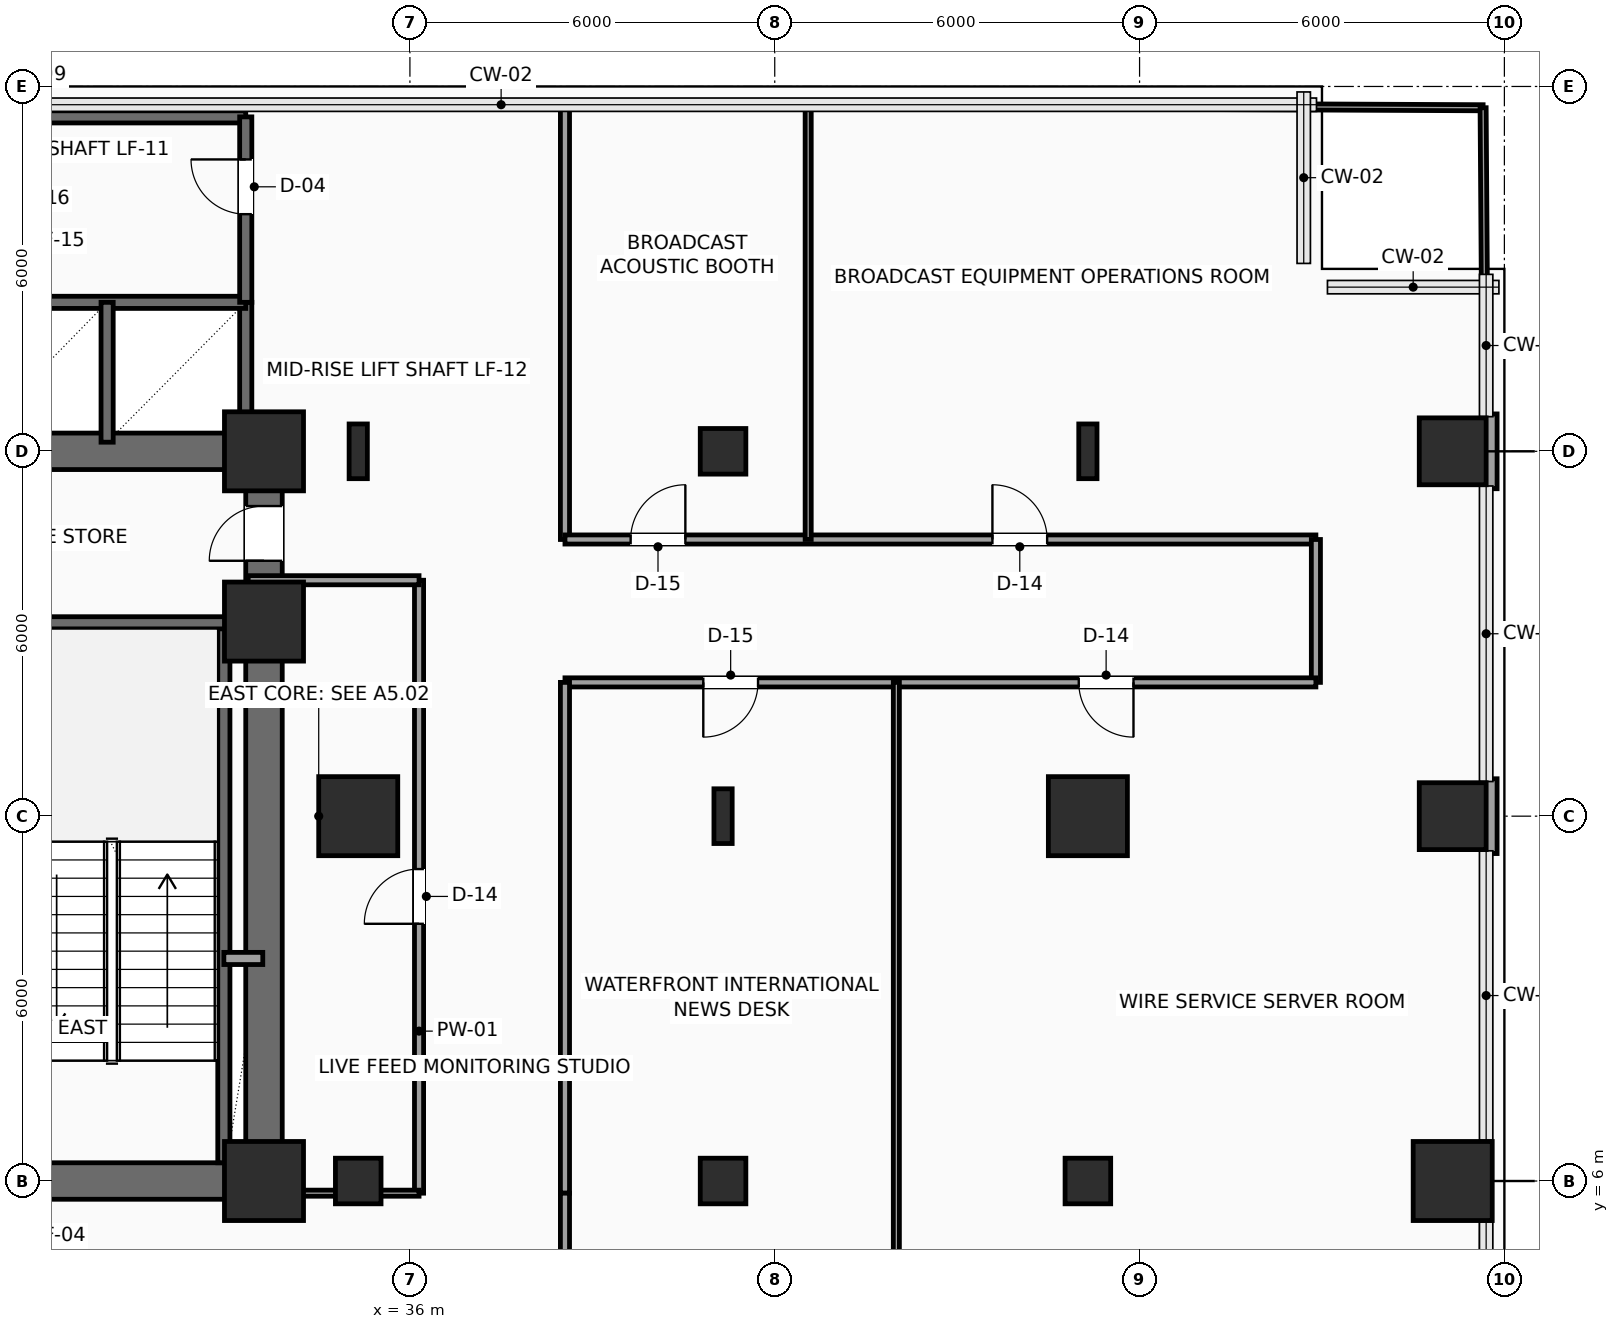
"""IFC4 building model, lengths in metres.
Left out: names, types, materials, properties, quantities, classifications, styles, units other than length and angle.
Written with IfcOpenShell. Run it as: python <this file> out.ifc"""

import sys

from ifc_helpers import new_model, si_unit, direction, frame, frame_2d, origin, origin_2d, place, context, subcontext, project, spatial, rectangle, hollow_rectangle, i_section, extrude, element, fill, save


model = new_model("IFC4")
c1 = context("Model", 3, precision=1e-05, world=origin(), true_north=direction((0.0, 1.0)))
c2 = subcontext(c1, "Body", "Model", "MODEL_VIEW")
j1 = project(units=[si_unit("LENGTHUNIT", "METRE"), si_unit("PLANEANGLEUNIT", "RADIAN")], contexts=[c1])
p1 = place(None, origin())
s1 = spatial("IfcSite", under=j1, at=p1, CompositionType="ELEMENT")
p2 = place(p1, origin())
s2 = spatial("IfcBuilding", under=s1, at=p2, CompositionType="ELEMENT")
p3 = place(p2, frame((0.0, 0.0, 32.4)))
s3 = spatial("IfcBuildingStorey", under=s2, at=p3, CompositionType="ELEMENT", Elevation=32.4)
for number, where, z_axis, x_axis in (
    (1, (33.6, 6.0, 0.0), (0.0, 0.0, 1.0), (1.0, 0.0, 0.0)),
    (2, (33.6, 15.2, 0.0), (0.0, 0.0, 1.0), (1.0, 0.0, 0.0)),
    (3, (33.6, 18.0, 0.0), (0.0, 0.0, 1.0), (1.0, 0.0, 0.0)),
):
    element("IfcColumn", number, at=place(p3, frame(where, z_axis=z_axis, x_axis=x_axis)), inside=s3, PredefinedType="COLUMN", context=c2, shape_type="SweptSolid", body=[
        extrude(rectangle(XDim=1.3, YDim=1.3, at=origin_2d()), origin(), (0.0, 0.0, 1.0), 3.9),
    ])
p4 = place(p3, frame((35.15, 6.0, 0.0), z_axis=(0.0, 0.0, 1.0), x_axis=(1.0, 0.0, 0.0)))
e4 = element("IfcColumn", 4, at=p4, inside=s3, PredefinedType="COLUMN", context=c2, shape_type="SweptSolid", body=[
    extrude(hollow_rectangle(XDim=0.75, YDim=0.75, WallThickness=0.035, InnerFilletRadius=0.035, OuterFilletRadius=0.05, at=origin_2d()), origin(), (0.0, 0.0, 1.0), 3.9),
])
p5 = place(p3, frame((35.15, 12.0, 0.0), z_axis=(0.0, 0.0, 1.0), x_axis=(1.0, 0.0, 0.0)))
e5 = element("IfcColumn", 5, at=p5, inside=s3, PredefinedType="COLUMN", context=c2, shape_type="SweptSolid", body=[
    extrude(rectangle(XDim=1.3, YDim=1.3, at=origin_2d()), origin(), (0.0, 0.0, 1.0), 3.9),
])
p6 = place(p3, frame((35.15, 18.0, 0.0), z_axis=(0.0, 0.0, 1.0), x_axis=(1.0, 0.0, 0.0)))
e6 = element("IfcColumn", 6, at=p6, inside=s3, PredefinedType="COLUMN", context=c2, shape_type="SweptSolid", body=[
    extrude(i_section(OverallWidth=0.3, OverallDepth=0.9, WebThickness=0.019, FlangeThickness=0.035, FilletRadius=0.03, at=origin_2d()), origin(), (0.0, 0.0, 1.0), 3.9),
])
p7 = place(p3, frame((41.15, 6.0, 0.0), z_axis=(0.0, 0.0, 1.0), x_axis=(1.0, 0.0, 0.0)))
e7 = element("IfcColumn", 7, at=p7, inside=s3, PredefinedType="COLUMN", context=c2, shape_type="SweptSolid", body=[
    extrude(hollow_rectangle(XDim=0.75, YDim=0.75, WallThickness=0.035, InnerFilletRadius=0.035, OuterFilletRadius=0.05, at=origin_2d()), origin(), (0.0, 0.0, 1.0), 3.9),
])
p8 = place(p3, frame((41.15, 12.0, 0.0), z_axis=(0.0, 0.0, 1.0), x_axis=(1.0, 0.0, 0.0)))
e8 = element("IfcColumn", 8, at=p8, inside=s3, PredefinedType="COLUMN", context=c2, shape_type="SweptSolid", body=[
    extrude(i_section(OverallWidth=0.3, OverallDepth=0.9, WebThickness=0.019, FlangeThickness=0.035, FilletRadius=0.03, at=origin_2d()), origin(), (0.0, 0.0, 1.0), 3.9),
])
for number, where, z_axis, x_axis in (
    (9, (41.15, 18.0, 0.0), (0.0, 0.0, 1.0), (1.0, 0.0, 0.0)),
    (10, (47.15, 6.0, 0.0), (0.0, 0.0, 1.0), (1.0, 0.0, 0.0)),
):
    element("IfcColumn", number, at=place(p3, frame(where, z_axis=z_axis, x_axis=x_axis)), inside=s3, PredefinedType="COLUMN", context=c2, shape_type="SweptSolid", body=[
        extrude(hollow_rectangle(XDim=0.75, YDim=0.75, WallThickness=0.035, InnerFilletRadius=0.035, OuterFilletRadius=0.05, at=origin_2d()), origin(), (0.0, 0.0, 1.0), 3.9),
    ])
p9 = place(p3, frame((47.15, 12.0, 0.0), z_axis=(0.0, 0.0, 1.0), x_axis=(1.0, 0.0, 0.0)))
e11 = element("IfcColumn", 11, at=p9, inside=s3, PredefinedType="COLUMN", context=c2, shape_type="SweptSolid", body=[
    extrude(rectangle(XDim=1.3, YDim=1.3, at=origin_2d()), origin(), (0.0, 0.0, 1.0), 3.9),
])
p10 = place(p3, frame((47.15, 18.0, 0.0), z_axis=(0.0, 0.0, 1.0), x_axis=(1.0, 0.0, 0.0)))
e12 = element("IfcColumn", 12, at=p10, inside=s3, PredefinedType="COLUMN", context=c2, shape_type="SweptSolid", body=[
    extrude(i_section(OverallWidth=0.3, OverallDepth=0.9, WebThickness=0.019, FlangeThickness=0.035, FilletRadius=0.03, at=origin_2d()), origin(), (0.0, 0.0, 1.0), 3.9),
])
p11 = place(p3, frame((53.15, 6.0, 0.0), z_axis=(0.0, 0.0, 1.0), x_axis=(1.0, 0.0, 0.0)))
e13 = element("IfcColumn", 13, at=p11, inside=s3, PredefinedType="COLUMN", context=c2, shape_type="SweptSolid", body=[
    extrude(rectangle(XDim=1.3, YDim=1.3, at=origin_2d()), origin(), (0.0, 0.0, 1.0), 3.9),
])
for number, where, z_axis, x_axis in (
    (14, (53.15, 12.0, 0.0), (0.0, 0.0, 1.0), (1.0, 0.0, 0.0)),
    (15, (53.15, 18.0, 0.0), (0.0, 0.0, 1.0), (1.0, 0.0, 0.0)),
):
    element("IfcColumn", number, at=place(p3, frame(where, z_axis=z_axis, x_axis=x_axis)), inside=s3, PredefinedType="COLUMN", context=c2, shape_type="SweptSolid", body=[
        extrude(rectangle(XDim=1.1, YDim=1.1, at=origin_2d()), origin(), (0.0, 0.0, 1.0), 3.9),
    ])
for number, where, z_axis, x_axis in (
    (16, (53.76, 18.615, 0.0), (0.0, 0.0, 1.0), (0.0, -1.0, 0.0)),
    (17, (53.76, 12.615, 0.0), (0.0, 0.0, 1.0), (0.0, -1.0, 0.0)),
):
    element("IfcWall", number, at=place(p3, frame(where, z_axis=z_axis, x_axis=x_axis)), inside=s3, PredefinedType="SOLIDWALL", context=c2, shape_type="SweptSolid", body=[
        extrude(rectangle(XDim=1.23, YDim=0.24, at=frame_2d((0.615, 0.0))), origin(), (0.0, 0.0, 1.0), 3.65),
    ])
for number, where, z_axis, x_axis in (
    (18, (24.0, 6.0, 0.0), (0.0, 0.0, 1.0), (1.0, 0.0, 0.0)),
    (19, (24.0, 18.0, 0.0), (0.0, 0.0, 1.0), (1.0, 0.0, 0.0)),
):
    element("IfcWall", number, at=place(p3, frame(where, z_axis=z_axis, x_axis=x_axis)), inside=s3, PredefinedType="SHEAR", context=c2, shape_type="SweptSolid", body=[
        extrude(rectangle(XDim=9.6, YDim=0.6, at=frame_2d((4.8, 0.0))), origin(), (0.0, 0.0, 1.0), 3.65),
    ])
p12 = place(p3, frame((33.6, 6.0, 0.0), z_axis=(0.0, 0.0, 1.0), x_axis=(0.0, 1.0, 0.0)))
e20 = element("IfcWall", 20, at=p12, inside=s3, PredefinedType="SHEAR", context=c2, shape_type="SweptSolid", body=[
    extrude(rectangle(XDim=12.0, YDim=0.6, at=frame_2d((6.0, 0.0))), origin(), (0.0, 0.0, 1.0), 3.65),
])
p13 = place(p12, frame((10.2, 0.0, 0.0)))
e21 = element("IfcOpeningElement", 21, at=p13, cuts=e20, PredefinedType="OPENING", context=c2, shape_type="SweptSolid", body=[
    extrude(rectangle(XDim=0.9, YDim=2.15, at=frame_2d((0.45, 1.075))), frame((0.0, 0.31, 0.0), z_axis=(0.0, -1.0, 0.0), x_axis=(1.0, 0.0, 0.0)), (0.0, 0.0, 1.0), 0.62),
])
p14 = place(p3, frame((32.94, 6.3, 0.0), z_axis=(0.0, 0.0, 1.0), x_axis=(0.0, 1.0, 0.0)))
e22 = element("IfcWall", 22, at=p14, inside=s3, PredefinedType="SHEAR", context=c2, shape_type="SweptSolid", body=[
    extrude(rectangle(XDim=8.88, YDim=0.2, at=frame_2d((4.44, 0.0))), origin(), (0.0, 0.0, 1.0), 3.65),
])
p15 = place(p3, frame((29.26, 15.18, 0.0), z_axis=(0.0, 0.0, 1.0), x_axis=(1.0, 0.0, 0.0)))
e23 = element("IfcWall", 23, at=p15, inside=s3, PredefinedType="SHEAR", context=c2, shape_type="SweptSolid", body=[
    extrude(rectangle(XDim=4.04, YDim=0.2, at=frame_2d((2.02, 0.0))), origin(), (0.0, 0.0, 1.0), 3.65),
])
p16 = place(p3, frame((32.94, 9.66, 0.0), z_axis=(0.0, 0.0, 1.0), x_axis=(1.0, 0.0, 0.0)))
e24 = element("IfcWall", 24, at=p16, inside=s3, PredefinedType="SOLIDWALL", context=c2, shape_type="SweptSolid", body=[
    extrude(rectangle(XDim=0.64, YDim=0.2, at=frame_2d((0.32, 0.0))), origin(), (0.0, 0.0, 1.0), 3.65),
])
p17 = place(p3, frame((33.3, 18.1, 0.0), z_axis=(0.0, 0.0, 1.0), x_axis=(0.0, 1.0, 0.0)))
e25 = element("IfcWall", 25, at=p17, inside=s3, PredefinedType="SHEAR", context=c2, shape_type="SweptSolid", body=[
    extrude(rectangle(XDim=2.35, YDim=0.2, at=frame_2d((1.175, 0.0))), origin(), (0.0, 0.0, 1.0), 3.65),
])
p18 = place(p3, frame((24.25, 20.45, 0.0), z_axis=(0.0, 0.0, 1.0), x_axis=(1.0, 0.0, 0.0)))
e26 = element("IfcWall", 26, at=p18, inside=s3, PredefinedType="SHEAR", context=c2, shape_type="SweptSolid", body=[
    extrude(rectangle(XDim=9.05, YDim=0.2, at=frame_2d((4.525, 0.0))), origin(), (0.0, 0.0, 1.0), 3.65),
])
p19 = place(p3, frame((31.02, 18.15, 0.0), z_axis=(0.0, 0.0, 1.0), x_axis=(0.0, 1.0, 0.0)))
e27 = element("IfcWall", 27, at=p19, inside=s3, PredefinedType="SHEAR", context=c2, shape_type="SweptSolid", body=[
    extrude(rectangle(XDim=2.3, YDim=0.2, at=frame_2d((1.15, 0.0))), origin(), (0.0, 0.0, 1.0), 3.65),
])
p20 = place(p3, frame((24.15, 23.5, 0.0), z_axis=(0.0, 0.0, 1.0), x_axis=(1.0, 0.0, 0.0)))
e28 = element("IfcWall", 28, at=p20, inside=s3, PredefinedType="SHEAR", context=c2, shape_type="SweptSolid", body=[
    extrude(rectangle(XDim=9.15, YDim=0.2, at=frame_2d((4.575, 0.0))), origin(), (0.0, 0.0, 1.0), 3.65),
])
p21 = place(p3, frame((33.3, 20.45, 0.0), z_axis=(0.0, 0.0, 1.0), x_axis=(0.0, 1.0, 0.0)))
e29 = element("IfcWall", 29, at=p21, inside=s3, PredefinedType="SHEAR", context=c2, shape_type="SweptSolid", body=[
    extrude(rectangle(XDim=3.05, YDim=0.2, at=frame_2d((1.525, 0.0))), origin(), (0.0, 0.0, 1.0), 3.65),
])
p22 = place(p21, frame((1.45, 0.0, 0.0)))
e30 = element("IfcOpeningElement", 30, at=p22, cuts=e29, PredefinedType="OPENING", context=c2, shape_type="SweptSolid", body=[
    extrude(rectangle(XDim=0.9, YDim=2.15, at=frame_2d((0.45, 1.075))), frame((0.0, 0.11, 0.0), z_axis=(0.0, -1.0, 0.0), x_axis=(1.0, 0.0, 0.0)), (0.0, 0.0, 1.0), 0.22),
])
p23 = place(p3, frame((36.15, 5.8, 0.0), z_axis=(0.0, 0.0, 1.0), x_axis=(0.0, 1.0, 0.0)))
e31 = element("IfcWall", 31, at=p23, inside=s3, PredefinedType="PARTITIONING", context=c2, shape_type="SweptSolid", body=[
    extrude(rectangle(XDim=10.08, YDim=0.15, at=frame_2d((5.04, 0.0))), origin(), (0.0, 0.0, 1.0), 3.65),
])
p24 = place(p23, frame((4.43, 0.0, 0.0)))
e32 = element("IfcOpeningElement", 32, at=p24, cuts=e31, PredefinedType="OPENING", context=c2, shape_type="SweptSolid", body=[
    extrude(rectangle(XDim=0.9, YDim=2.1, at=frame_2d((0.45, 1.05))), frame((0.0, 0.085, 0.0), z_axis=(0.0, -1.0, 0.0), x_axis=(1.0, 0.0, 0.0)), (0.0, 0.0, 1.0), 0.17),
])
p25 = place(p3, frame((36.15, 15.88, 0.0), z_axis=(0.0, 0.0, 1.0), x_axis=(-1.0, 0.0, 0.0)))
e33 = element("IfcWall", 33, at=p25, inside=s3, PredefinedType="PARTITIONING", context=c2, shape_type="SweptSolid", body=[
    extrude(rectangle(XDim=2.81, YDim=0.15, at=frame_2d((1.405, 0.0))), origin(), (0.0, 0.0, 1.0), 3.65),
])
p26 = place(p3, frame((38.55, 23.7, 0.0), z_axis=(0.0, 0.0, 1.0), x_axis=(0.0, -1.0, 0.0)))
e34 = element("IfcWall", 34, at=p26, inside=s3, PredefinedType="PARTITIONING", context=c2, shape_type="SweptSolid", body=[
    extrude(rectangle(XDim=7.15, YDim=0.15, at=frame_2d((3.575, 0.0))), origin(), (0.0, 0.0, 1.0), 3.65),
])
p27 = place(p3, frame((38.55, 16.55, 0.0), z_axis=(0.0, 0.0, 1.0), x_axis=(1.0, 0.0, 0.0)))
e35 = element("IfcWall", 35, at=p27, inside=s3, PredefinedType="PARTITIONING", context=c2, shape_type="SweptSolid", body=[
    extrude(rectangle(XDim=12.35, YDim=0.15, at=frame_2d((6.175, 0.0))), origin(), (0.0, 0.0, 1.0), 3.65),
])
p28 = place(p27, frame((1.08, 0.0, 0.0)))
e36 = element("IfcOpeningElement", 36, at=p28, cuts=e35, PredefinedType="OPENING", context=c2, shape_type="SweptSolid", body=[
    extrude(rectangle(XDim=0.9, YDim=2.1, at=frame_2d((0.45, 1.05))), frame((0.0, 0.085, 0.0), z_axis=(0.0, -1.0, 0.0), x_axis=(1.0, 0.0, 0.0)), (0.0, 0.0, 1.0), 0.17),
])
p29 = place(p27, frame((7.03, 0.0, 0.0)))
e37 = element("IfcOpeningElement", 37, at=p29, cuts=e35, PredefinedType="OPENING", context=c2, shape_type="SweptSolid", body=[
    extrude(rectangle(XDim=0.9, YDim=2.1, at=frame_2d((0.45, 1.05))), frame((0.0, 0.085, 0.0), z_axis=(0.0, -1.0, 0.0), x_axis=(1.0, 0.0, 0.0)), (0.0, 0.0, 1.0), 0.17),
])
p30 = place(p3, frame((50.9, 16.55, 0.0), z_axis=(0.0, 0.0, 1.0), x_axis=(0.0, -1.0, 0.0)))
e38 = element("IfcWall", 38, at=p30, inside=s3, PredefinedType="PARTITIONING", context=c2, shape_type="SweptSolid", body=[
    extrude(rectangle(XDim=2.35, YDim=0.15, at=frame_2d((1.175, 0.0))), origin(), (0.0, 0.0, 1.0), 3.65),
])
p31 = place(p3, frame((50.9, 14.2, 0.0), z_axis=(0.0, 0.0, 1.0), x_axis=(-1.0, 0.0, 0.0)))
e39 = element("IfcWall", 39, at=p31, inside=s3, PredefinedType="PARTITIONING", context=c2, shape_type="SweptSolid", body=[
    extrude(rectangle(XDim=12.35, YDim=0.15, at=frame_2d((6.175, 0.0))), origin(), (0.0, 0.0, 1.0), 3.65),
])
p32 = place(p31, frame((9.175, 0.0, 0.0)))
e40 = element("IfcOpeningElement", 40, at=p32, cuts=e39, PredefinedType="OPENING", context=c2, shape_type="SweptSolid", body=[
    extrude(rectangle(XDim=0.9, YDim=2.1, at=frame_2d((0.45, 1.05))), frame((0.0, 0.085, 0.0), z_axis=(0.0, -1.0, 0.0), x_axis=(1.0, 0.0, 0.0)), (0.0, 0.0, 1.0), 0.17),
])
p33 = place(p31, frame((3.0, 0.0, 0.0)))
e41 = element("IfcOpeningElement", 41, at=p33, cuts=e39, PredefinedType="OPENING", context=c2, shape_type="SweptSolid", body=[
    extrude(rectangle(XDim=0.9, YDim=2.1, at=frame_2d((0.45, 1.05))), frame((0.0, 0.085, 0.0), z_axis=(0.0, -1.0, 0.0), x_axis=(1.0, 0.0, 0.0)), (0.0, 0.0, 1.0), 0.17),
])
p34 = place(p3, frame((38.55, 14.2, 0.0), z_axis=(0.0, 0.0, 1.0), x_axis=(0.0, -1.0, 0.0)))
e42 = element("IfcWall", 42, at=p34, inside=s3, PredefinedType="PARTITIONING", context=c2, shape_type="SweptSolid", body=[
    extrude(rectangle(XDim=8.4, YDim=0.15, at=frame_2d((4.2, 0.0))), origin(), (0.0, 0.0, 1.0), 3.65),
])
p35 = place(p3, frame((38.55, 5.8, 0.0), z_axis=(0.0, 0.0, 1.0), x_axis=(0.0, -1.0, 0.0)))
e43 = element("IfcWall", 43, at=p35, inside=s3, PredefinedType="PARTITIONING", context=c2, shape_type="SweptSolid", body=[
    extrude(rectangle(XDim=2.35, YDim=0.15, at=frame_2d((1.175, 0.0))), origin(), (0.0, 0.0, 1.0), 3.65),
])
p36 = place(p3, frame((44.0, 0.3, 0.0), z_axis=(0.0, 0.0, 1.0), x_axis=(0.0, 1.0, 0.0)))
e44 = element("IfcWall", 44, at=p36, inside=s3, PredefinedType="PARTITIONING", context=c2, shape_type="SweptSolid", body=[
    extrude(rectangle(XDim=13.9, YDim=0.1, at=frame_2d((6.95, 0.0))), origin(), (0.0, 0.0, 1.0), 3.65),
])
p37 = place(p3, frame((53.65, 0.35, 0.0), z_axis=(0.0, 0.0, 1.0), x_axis=(0.003606251025, 0.999993497456, 0.0)))
e45 = element("IfcWall", 45, at=p37, inside=s3, PredefinedType="PARTITIONING", context=c2, shape_type="SweptSolid", body=[
    extrude(rectangle(XDim=11.035, YDim=0.1, at=frame_2d((5.518, 0.0))), origin(), (0.0, 0.0, 1.0), 3.65),
])
p38 = place(p3, frame((53.694, 12.615, 0.0), z_axis=(0.0, 0.0, 1.0), x_axis=(0.003542799701, 0.999993724265, 0.0)))
e46 = element("IfcWall", 46, at=p38, inside=s3, PredefinedType="PARTITIONING", context=c2, shape_type="SweptSolid", body=[
    extrude(rectangle(XDim=1.585, YDim=0.1, at=frame_2d((0.792, 0.0))), origin(), (0.0, 0.0, 1.0), 3.65),
])
p39 = place(p3, frame((42.55, 16.55, 0.0), z_axis=(0.0, 0.0, 1.0), x_axis=(0.0, 1.0, 0.0)))
e47 = element("IfcWall", 47, at=p39, inside=s3, PredefinedType="PARTITIONING", context=c2, shape_type="SweptSolid", body=[
    extrude(rectangle(XDim=7.15, YDim=0.1, at=frame_2d((3.575, 0.0))), origin(), (0.0, 0.0, 1.0), 3.65),
])
p40 = place(p3, frame((42.55, 23.7, 0.0), z_axis=(0.0, 0.0, 1.0), x_axis=(0.999989834782, -0.004508917104, 0.0)))
e48 = element("IfcWall", 48, at=p40, inside=s3, PredefinedType="PARTITIONING", context=c2, shape_type="SweptSolid", body=[
    extrude(rectangle(XDim=11.1, YDim=0.1, at=frame_2d((5.55, 0.0))), origin(), (0.0, 0.0, 1.0), 3.65),
])
p41 = place(p3, frame((53.7, 16.55, 0.0), z_axis=(0.0, 0.0, 1.0), x_axis=(-0.007017371073, 0.999975377948, 0.0)))
e49 = element("IfcWall", 49, at=p41, inside=s3, PredefinedType="PARTITIONING", context=c2, shape_type="SweptSolid", body=[
    extrude(rectangle(XDim=0.835, YDim=0.1, at=frame_2d((0.417, 0.0))), origin(), (0.0, 0.0, 1.0), 3.65),
])
p42 = place(p3, frame((53.686, 18.615, 0.0), z_axis=(0.0, 0.0, 1.0), x_axis=(-0.007079296972, 0.999974941463, 0.0)))
e50 = element("IfcWall", 50, at=p42, inside=s3, PredefinedType="PARTITIONING", context=c2, shape_type="SweptSolid", body=[
    extrude(rectangle(XDim=5.035, YDim=0.1, at=frame_2d((2.518, 0.0))), origin(), (0.0, 0.0, 1.0), 3.65),
])
p43 = place(p3, frame((33.65, 5.8, 0.0), z_axis=(0.0, 0.0, 1.0), x_axis=(1.0, 0.0, 0.0)))
e51 = element("IfcWall", 51, at=p43, inside=s3, PredefinedType="PARTITIONING", context=c2, shape_type="SweptSolid", body=[
    extrude(rectangle(XDim=2.5, YDim=0.1, at=frame_2d((1.25, 0.0))), origin(), (0.0, 0.0, 1.0), 2.992),
])
p44 = place(p13, origin())
e52 = element("IfcDoor", 52, at=p44, inside=s3, OperationType="SINGLE_SWING_LEFT", PredefinedType="DOOR", context=c2, shape_type="SweptSolid", body=[
    extrude(rectangle(XDim=0.9, YDim=2.15, at=frame_2d((0.45, 1.075))), frame((0.0, 0.025, 0.0), z_axis=(0.0, -1.0, 0.0), x_axis=(1.0, 0.0, 0.0)), (0.0, 0.0, 1.0), 0.05),
])
fill(e21, e52)
p45 = place(p22, origin())
e53 = element("IfcDoor", 53, at=p45, inside=s3, OperationType="SINGLE_SWING_RIGHT", PredefinedType="DOOR", context=c2, shape_type="SweptSolid", body=[
    extrude(rectangle(XDim=0.9, YDim=2.15, at=frame_2d((0.45, 1.075))), frame((0.0, 0.025, 0.0), z_axis=(0.0, -1.0, 0.0), x_axis=(1.0, 0.0, 0.0)), (0.0, 0.0, 1.0), 0.05),
])
fill(e30, e53)
p46 = place(p24, origin())
e54 = element("IfcDoor", 54, at=p46, inside=s3, OperationType="SINGLE_SWING_LEFT", PredefinedType="DOOR", context=c2, shape_type="SweptSolid", body=[
    extrude(rectangle(XDim=0.9, YDim=2.1, at=frame_2d((0.45, 1.05))), frame((0.0, 0.025, 0.0), z_axis=(0.0, -1.0, 0.0), x_axis=(1.0, 0.0, 0.0)), (0.0, 0.0, 1.0), 0.05),
])
fill(e32, e54)
p47 = place(p28, origin())
e55 = element("IfcDoor", 55, at=p47, inside=s3, OperationType="SINGLE_SWING_RIGHT", PredefinedType="DOOR", context=c2, shape_type="SweptSolid", body=[
    extrude(rectangle(XDim=0.9, YDim=2.1, at=frame_2d((0.45, 1.05))), frame((0.0, 0.025, 0.0), z_axis=(0.0, -1.0, 0.0), x_axis=(1.0, 0.0, 0.0)), (0.0, 0.0, 1.0), 0.05),
])
fill(e36, e55)
p48 = place(p29, origin())
e56 = element("IfcDoor", 56, at=p48, inside=s3, OperationType="SINGLE_SWING_LEFT", PredefinedType="DOOR", context=c2, shape_type="SweptSolid", body=[
    extrude(rectangle(XDim=0.9, YDim=2.1, at=frame_2d((0.45, 1.05))), frame((0.0, 0.025, 0.0), z_axis=(0.0, -1.0, 0.0), x_axis=(1.0, 0.0, 0.0)), (0.0, 0.0, 1.0), 0.05),
])
fill(e37, e56)
p49 = place(p32, origin())
e57 = element("IfcDoor", 57, at=p49, inside=s3, OperationType="SINGLE_SWING_RIGHT", PredefinedType="DOOR", context=c2, shape_type="SweptSolid", body=[
    extrude(rectangle(XDim=0.9, YDim=2.1, at=frame_2d((0.45, 1.05))), frame((0.0, 0.025, 0.0), z_axis=(0.0, -1.0, 0.0), x_axis=(1.0, 0.0, 0.0)), (0.0, 0.0, 1.0), 0.05),
])
fill(e40, e57)
p50 = place(p33, origin())
e58 = element("IfcDoor", 58, at=p50, inside=s3, OperationType="SINGLE_SWING_LEFT", PredefinedType="DOOR", context=c2, shape_type="SweptSolid", body=[
    extrude(rectangle(XDim=0.9, YDim=2.1, at=frame_2d((0.45, 1.05))), frame((0.0, 0.025, 0.0), z_axis=(0.0, -1.0, 0.0), x_axis=(1.0, 0.0, 0.0)), (0.0, 0.0, 1.0), 0.05),
])
fill(e41, e58)
save(model, sys.argv[1])
